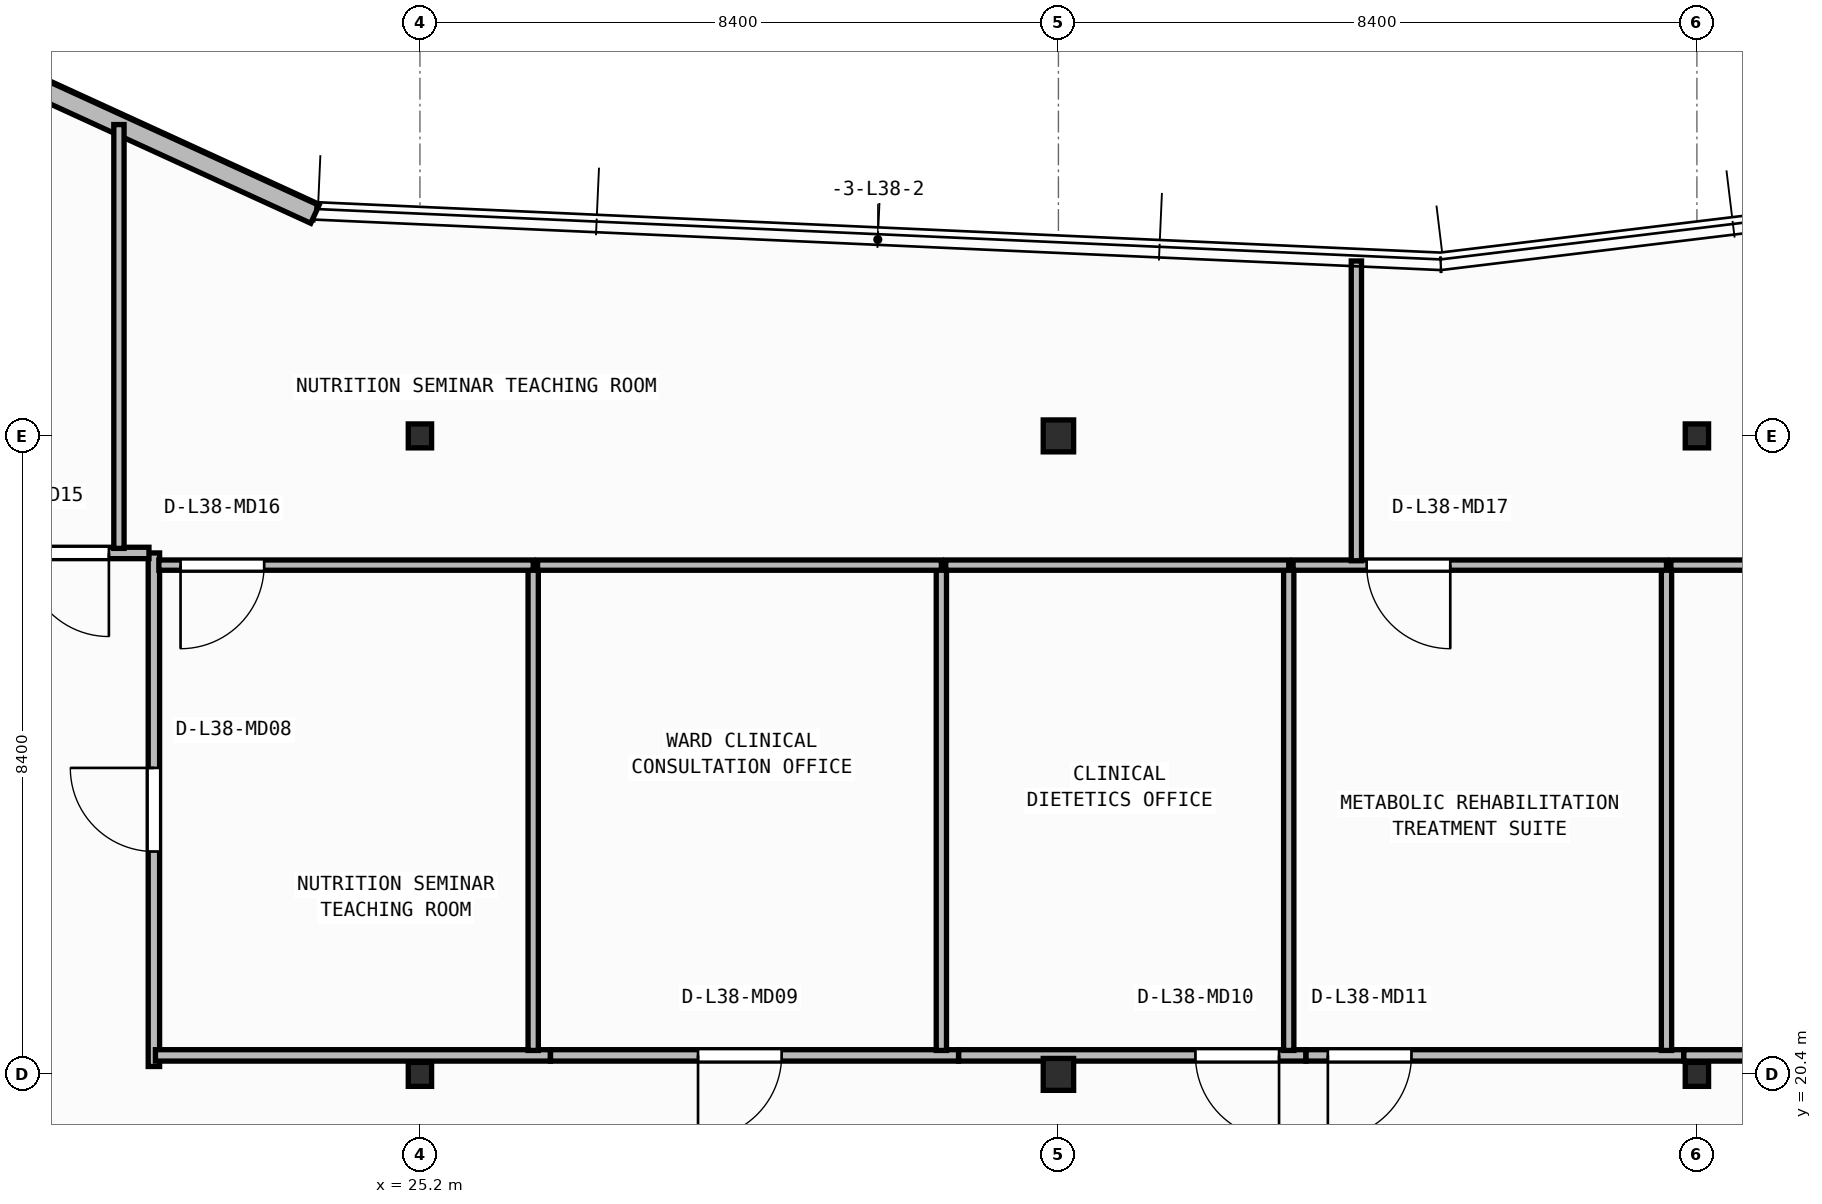
"""IFC4 building model, lengths in metres.
Left out: names, types, materials, properties, quantities, classifications, styles, units other than length and angle.
Written with IfcOpenShell. Run it as: python <this file> out.ifc"""

import sys

from ifc_helpers import new_model, si_unit, direction, frame, frame_2d, origin, origin_2d, place, context, subcontext, project, spatial, rectangle, i_section, extrude, element, fill, save


model = new_model("IFC4")
c1 = context("Model", 3, precision=1e-05, world=origin(), true_north=direction((0.0, 1.0)))
c2 = subcontext(c1, "Body", "Model", "MODEL_VIEW")
j1 = project(units=[si_unit("LENGTHUNIT", "METRE"), si_unit("PLANEANGLEUNIT", "RADIAN")], contexts=[c1])
p1 = place(None, origin())
s1 = spatial("IfcSite", under=j1, at=p1, CompositionType="ELEMENT")
p2 = place(p1, origin())
s2 = spatial("IfcBuilding", under=s1, at=p2, CompositionType="ELEMENT")
p3 = place(p2, frame((0.0, 0.0, 154.7)))
s3 = spatial("IfcBuildingStorey", under=s2, at=p3, CompositionType="ELEMENT", Elevation=154.7)
p4 = place(p3, frame((25.2, 20.4, 0.0), z_axis=(0.0, 0.0, 1.0), x_axis=(1.0, 0.0, 0.0)))
e1 = element("IfcColumn", 1, at=p4, inside=s3, PredefinedType="COLUMN", context=c2, shape_type="SweptSolid", body=[
    extrude(i_section(OverallWidth=0.307, OverallDepth=0.315, WebThickness=0.012, FlangeThickness=0.019, FilletRadius=0.017, at=origin_2d()), origin(), (0.0, 0.0, 1.0), 3.95),
])
p5 = place(p3, frame((33.6, 20.4, 0.0), z_axis=(0.0, 0.0, 1.0), x_axis=(1.0, 0.0, 0.0)))
e2 = element("IfcColumn", 2, at=p5, inside=s3, PredefinedType="COLUMN", context=c2, shape_type="SweptSolid", body=[
    extrude(i_section(OverallWidth=0.4, OverallDepth=0.42, WebThickness=0.025, FlangeThickness=0.04, at=origin_2d()), origin(), (0.0, 0.0, 1.0), 3.95),
])
for number, where, z_axis, x_axis in (
    (3, (42.0, 20.4, 0.0), (0.0, 0.0, 1.0), (1.0, 0.0, 0.0)),
    (4, (25.2, 28.8, 0.0), (0.0, 0.0, 1.0), (1.0, 0.0, 0.0)),
):
    element("IfcColumn", number, at=place(p3, frame(where, z_axis=z_axis, x_axis=x_axis)), inside=s3, PredefinedType="COLUMN", context=c2, shape_type="SweptSolid", body=[
        extrude(i_section(OverallWidth=0.307, OverallDepth=0.315, WebThickness=0.012, FlangeThickness=0.019, FilletRadius=0.017, at=origin_2d()), origin(), (0.0, 0.0, 1.0), 3.95),
    ])
p6 = place(p3, frame((33.6, 28.8, 0.0), z_axis=(0.0, 0.0, 1.0), x_axis=(1.0, 0.0, 0.0)))
e5 = element("IfcColumn", 5, at=p6, inside=s3, PredefinedType="COLUMN", context=c2, shape_type="SweptSolid", body=[
    extrude(i_section(OverallWidth=0.4, OverallDepth=0.42, WebThickness=0.025, FlangeThickness=0.04, at=origin_2d()), origin(), (0.0, 0.0, 1.0), 3.95),
])
p7 = place(p3, frame((42.0, 28.8, 0.0), z_axis=(0.0, 0.0, 1.0), x_axis=(1.0, 0.0, 0.0)))
e6 = element("IfcColumn", 6, at=p7, inside=s3, PredefinedType="COLUMN", context=c2, shape_type="SweptSolid", body=[
    extrude(i_section(OverallWidth=0.307, OverallDepth=0.315, WebThickness=0.012, FlangeThickness=0.019, FilletRadius=0.017, at=origin_2d()), origin(), (0.0, 0.0, 1.0), 3.95),
])
p8 = place(p3, frame((23.818, 31.716, 0.0), z_axis=(0.0, 0.0, 1.0), x_axis=(-0.909209527513, 0.416338846471, 0.0)))
e7 = element("IfcWall", 7, at=p8, inside=s3, PredefinedType="STANDARD", context=c2, shape_type="SweptSolid", body=[
    extrude(rectangle(XDim=13.787, YDim=0.26, at=frame_2d((6.894, 0.0))), origin(), (0.0, 0.0, 1.0), 3.71),
])
p9 = place(p8, frame((5.694, 0.0, 0.9)))
e8 = element("IfcOpeningElement", 8, at=p9, cuts=e7, PredefinedType="OPENING", context=c2, shape_type="SweptSolid", body=[
    extrude(rectangle(XDim=2.4, YDim=1.65, at=frame_2d((1.2, 0.825))), frame((0.0, 0.14, 0.0), z_axis=(0.0, -1.0, 0.0), x_axis=(1.0, 0.0, 0.0)), (0.0, 0.0, 1.0), 0.28),
])
p10 = place(p3, frame((21.7, 20.504, 0.0), z_axis=(0.0, 0.0, 1.0), x_axis=(0.0, 1.0, 0.0)))
e9 = element("IfcWall", 9, at=p10, inside=s3, PredefinedType="PARTITIONING", context=c2, shape_type="SweptSolid", body=[
    extrude(rectangle(XDim=6.756, YDim=0.15, at=frame_2d((3.378, 0.0))), origin(), (0.0, 0.0, 1.0), 3.71),
])
p11 = place(p10, frame((2.828, 0.0, 0.0)))
e10 = element("IfcOpeningElement", 10, at=p11, cuts=e9, PredefinedType="OPENING", context=c2, shape_type="SweptSolid", body=[
    extrude(rectangle(XDim=1.1, YDim=2.1, at=frame_2d((0.55, 1.05))), frame((0.0, 0.085, 0.0), z_axis=(0.0, -1.0, 0.0), x_axis=(1.0, 0.0, 0.0)), (0.0, 0.0, 1.0), 0.17),
])
p12 = place(p3, frame((21.635, 27.26, 0.0), z_axis=(0.0, 0.0, 1.0), x_axis=(-1.0, 0.0, 0.0)))
e11 = element("IfcWall", 11, at=p12, inside=s3, PredefinedType="PARTITIONING", context=c2, shape_type="SweptSolid", body=[
    extrude(rectangle(XDim=2.435, YDim=0.15, at=frame_2d((1.218, 0.0))), origin(), (0.0, 0.0, 1.0), 3.71),
])
p13 = place(p12, frame((0.527, 0.0, 0.0)))
e12 = element("IfcOpeningElement", 12, at=p13, cuts=e11, PredefinedType="OPENING", context=c2, shape_type="SweptSolid", body=[
    extrude(rectangle(XDim=1.1, YDim=2.1, at=frame_2d((0.55, 1.05))), frame((0.0, 0.085, 0.0), z_axis=(0.0, -1.0, 0.0), x_axis=(1.0, 0.0, 0.0)), (0.0, 0.0, 1.0), 0.17),
])
p14 = place(p3, frame((26.916, 20.65, 0.0), z_axis=(0.0, 0.0, 1.0), x_axis=(-1.0, 0.0, 0.0)))
e13 = element("IfcWall", 13, at=p14, inside=s3, PredefinedType="PARTITIONING", context=c2, shape_type="SweptSolid", body=[
    extrude(rectangle(XDim=5.196, YDim=0.15, at=frame_2d((2.598, 0.0))), origin(), (0.0, 0.0, 1.0), 3.083),
])
p15 = place(p3, frame((32.286, 20.65, 0.0), z_axis=(0.0, 0.0, 1.0), x_axis=(-1.0, 0.0, 0.0)))
e14 = element("IfcWall", 14, at=p15, inside=s3, PredefinedType="PARTITIONING", context=c2, shape_type="SweptSolid", body=[
    extrude(rectangle(XDim=5.368, YDim=0.15, at=frame_2d((2.684, 0.0))), origin(), (0.0, 0.0, 1.0), 3.083),
])
p16 = place(p15, frame((2.327, 0.0, 0.0)))
e15 = element("IfcOpeningElement", 15, at=p16, cuts=e14, PredefinedType="OPENING", context=c2, shape_type="SweptSolid", body=[
    extrude(rectangle(XDim=1.1, YDim=2.1, at=frame_2d((0.55, 1.05))), frame((0.0, 0.085, 0.0), z_axis=(0.0, -1.0, 0.0), x_axis=(1.0, 0.0, 0.0)), (0.0, 0.0, 1.0), 0.17),
])
p17 = place(p3, frame((36.856, 20.65, 0.0), z_axis=(0.0, 0.0, 1.0), x_axis=(-1.0, 0.0, 0.0)))
e16 = element("IfcWall", 16, at=p17, inside=s3, PredefinedType="PARTITIONING", context=c2, shape_type="SweptSolid", body=[
    extrude(rectangle(XDim=4.568, YDim=0.15, at=frame_2d((2.284, 0.0))), origin(), (0.0, 0.0, 1.0), 3.083),
])
p18 = place(p17, frame((0.354, 0.0, 0.0)))
e17 = element("IfcOpeningElement", 17, at=p18, cuts=e16, PredefinedType="OPENING", context=c2, shape_type="SweptSolid", body=[
    extrude(rectangle(XDim=1.1, YDim=2.1, at=frame_2d((0.55, 1.05))), frame((0.0, 0.085, 0.0), z_axis=(0.0, -1.0, 0.0), x_axis=(1.0, 0.0, 0.0)), (0.0, 0.0, 1.0), 0.17),
])
p19 = place(p3, frame((41.826, 20.65, 0.0), z_axis=(0.0, 0.0, 1.0), x_axis=(-1.0, 0.0, 0.0)))
e18 = element("IfcWall", 18, at=p19, inside=s3, PredefinedType="PARTITIONING", context=c2, shape_type="SweptSolid", body=[
    extrude(rectangle(XDim=4.968, YDim=0.15, at=frame_2d((2.484, 0.0))), origin(), (0.0, 0.0, 1.0), 3.083),
])
p20 = place(p19, frame((3.581, 0.0, 0.0)))
e19 = element("IfcOpeningElement", 19, at=p20, cuts=e18, PredefinedType="OPENING", context=c2, shape_type="SweptSolid", body=[
    extrude(rectangle(XDim=1.1, YDim=2.1, at=frame_2d((0.55, 1.05))), frame((0.0, 0.085, 0.0), z_axis=(0.0, -1.0, 0.0), x_axis=(1.0, 0.0, 0.0)), (0.0, 0.0, 1.0), 0.17),
])
p21 = place(p3, frame((47.196, 20.65, 0.0), z_axis=(0.0, 0.0, 1.0), x_axis=(-1.0, 0.0, 0.0)))
e20 = element("IfcWall", 20, at=p21, inside=s3, PredefinedType="PARTITIONING", context=c2, shape_type="SweptSolid", body=[
    extrude(rectangle(XDim=5.368, YDim=0.15, at=frame_2d((2.684, 0.0))), origin(), (0.0, 0.0, 1.0), 3.083),
])
p22 = place(p21, frame((0.393, 0.0, 0.0)))
e21 = element("IfcOpeningElement", 21, at=p22, cuts=e20, PredefinedType="OPENING", context=c2, shape_type="SweptSolid", body=[
    extrude(rectangle(XDim=1.1, YDim=2.1, at=frame_2d((0.55, 1.05))), frame((0.0, 0.085, 0.0), z_axis=(0.0, -1.0, 0.0), x_axis=(1.0, 0.0, 0.0)), (0.0, 0.0, 1.0), 0.17),
])
p23 = place(p3, frame((26.69, 20.715, 0.0), z_axis=(0.0, 0.0, 1.0), x_axis=(0.0, 1.0, 0.0)))
e22 = element("IfcWall", 22, at=p23, inside=s3, PredefinedType="PARTITIONING", context=c2, shape_type="SweptSolid", body=[
    extrude(rectangle(XDim=6.385, YDim=0.135, at=frame_2d((3.192, 0.0))), origin(), (0.0, 0.0, 1.0), 3.71),
])
p24 = place(p3, frame((26.69, 27.1, 0.0), z_axis=(0.0, 0.0, 1.0), x_axis=(-1.0, 0.0, 0.0)))
e23 = element("IfcWall", 23, at=p24, inside=s3, PredefinedType="PARTITIONING", context=c2, shape_type="SweptSolid", body=[
    extrude(rectangle(XDim=4.925, YDim=0.135, at=frame_2d((2.462, 0.0))), origin(), (0.0, 0.0, 1.0), 3.71),
])
p25 = place(p24, frame((3.539, 0.0, 0.0)))
e24 = element("IfcOpeningElement", 24, at=p25, cuts=e23, PredefinedType="OPENING", context=c2, shape_type="SweptSolid", body=[
    extrude(rectangle(XDim=1.1, YDim=2.1, at=frame_2d((0.55, 1.05))), frame((0.0, 0.077, 0.0), z_axis=(0.0, -1.0, 0.0), x_axis=(1.0, 0.0, 0.0)), (0.0, 0.0, 1.0), 0.155),
])
p26 = place(p3, frame((32.06, 20.715, 0.0), z_axis=(0.0, 0.0, 1.0), x_axis=(0.0, 1.0, 0.0)))
e25 = element("IfcWall", 25, at=p26, inside=s3, PredefinedType="PARTITIONING", context=c2, shape_type="SweptSolid", body=[
    extrude(rectangle(XDim=6.385, YDim=0.135, at=frame_2d((3.192, 0.0))), origin(), (0.0, 0.0, 1.0), 3.71),
])
p27 = place(p3, frame((32.06, 27.1, 0.0), z_axis=(0.0, 0.0, 1.0), x_axis=(-1.0, 0.0, 0.0)))
e26 = element("IfcWall", 26, at=p27, inside=s3, PredefinedType="PARTITIONING", context=c2, shape_type="SweptSolid", body=[
    extrude(rectangle(XDim=5.312, YDim=0.135, at=frame_2d((2.656, 0.0))), origin(), (0.0, 0.0, 1.0), 3.71),
])
p28 = place(p3, frame((36.63, 20.715, 0.0), z_axis=(0.0, 0.0, 1.0), x_axis=(0.0, 1.0, 0.0)))
e27 = element("IfcWall", 27, at=p28, inside=s3, PredefinedType="PARTITIONING", context=c2, shape_type="SweptSolid", body=[
    extrude(rectangle(XDim=6.385, YDim=0.135, at=frame_2d((3.192, 0.0))), origin(), (0.0, 0.0, 1.0), 3.71),
])
p29 = place(p3, frame((36.63, 27.1, 0.0), z_axis=(0.0, 0.0, 1.0), x_axis=(-1.0, 0.0, 0.0)))
e28 = element("IfcWall", 28, at=p29, inside=s3, PredefinedType="PARTITIONING", context=c2, shape_type="SweptSolid", body=[
    extrude(rectangle(XDim=4.512, YDim=0.135, at=frame_2d((2.256, 0.0))), origin(), (0.0, 0.0, 1.0), 3.71),
])
p30 = place(p3, frame((41.6, 20.715, 0.0), z_axis=(0.0, 0.0, 1.0), x_axis=(0.0, 1.0, 0.0)))
e29 = element("IfcWall", 29, at=p30, inside=s3, PredefinedType="PARTITIONING", context=c2, shape_type="SweptSolid", body=[
    extrude(rectangle(XDim=6.385, YDim=0.135, at=frame_2d((3.192, 0.0))), origin(), (0.0, 0.0, 1.0), 3.152),
])
p31 = place(p3, frame((41.6, 27.1, 0.0), z_axis=(0.0, 0.0, 1.0), x_axis=(-1.0, 0.0, 0.0)))
e30 = element("IfcWall", 30, at=p31, inside=s3, PredefinedType="PARTITIONING", context=c2, shape_type="SweptSolid", body=[
    extrude(rectangle(XDim=4.913, YDim=0.135, at=frame_2d((2.456, 0.0))), origin(), (0.0, 0.0, 1.0), 3.71),
])
p32 = place(p31, frame((2.845, 0.0, 0.0)))
e31 = element("IfcOpeningElement", 31, at=p32, cuts=e30, PredefinedType="OPENING", context=c2, shape_type="SweptSolid", body=[
    extrude(rectangle(XDim=1.1, YDim=2.1, at=frame_2d((0.55, 1.05))), frame((0.0, 0.077, 0.0), z_axis=(0.0, -1.0, 0.0), x_axis=(1.0, 0.0, 0.0)), (0.0, 0.0, 1.0), 0.155),
])
p33 = place(p3, frame((46.97, 27.1, 0.0), z_axis=(0.0, 0.0, 1.0), x_axis=(-1.0, 0.0, 0.0)))
e32 = element("IfcWall", 32, at=p33, inside=s3, PredefinedType="PARTITIONING", context=c2, shape_type="SweptSolid", body=[
    extrude(rectangle(XDim=5.312, YDim=0.135, at=frame_2d((2.656, 0.0))), origin(), (0.0, 0.0, 1.0), 3.71),
])
p34 = place(p3, frame((21.24, 27.32, 0.0), z_axis=(0.0, 0.0, 1.0), x_axis=(0.0, 1.0, 0.0)))
e33 = element("IfcWall", 33, at=p34, inside=s3, PredefinedType="PARTITIONING", context=c2, shape_type="SweptSolid", body=[
    extrude(rectangle(XDim=5.576, YDim=0.135, at=frame_2d((2.788, 0.0))), origin(), (0.0, 0.0, 1.0), 3.71),
])
p35 = place(p3, frame((37.52, 27.157, 0.0), z_axis=(0.0, 0.0, 1.0), x_axis=(0.0, 1.0, 0.0)))
e34 = element("IfcWall", 34, at=p35, inside=s3, PredefinedType="PARTITIONING", context=c2, shape_type="SweptSolid", body=[
    extrude(rectangle(XDim=3.944, YDim=0.135, at=frame_2d((1.972, 0.0))), origin(), (0.0, 0.0, 1.0), 3.71),
])
p36 = place(p11, origin())
e35 = element("IfcDoor", 35, at=p36, inside=s3, OperationType="SINGLE_SWING_RIGHT", PredefinedType="DOOR", context=c2, shape_type="SweptSolid", body=[
    extrude(rectangle(XDim=1.1, YDim=2.1, at=frame_2d((0.55, 1.05))), frame((0.0, 0.025, 0.0), z_axis=(0.0, -1.0, 0.0), x_axis=(1.0, 0.0, 0.0)), (0.0, 0.0, 1.0), 0.05),
])
fill(e10, e35)
p37 = place(p13, origin())
e36 = element("IfcDoor", 36, at=p37, inside=s3, OperationType="SINGLE_SWING_LEFT", PredefinedType="DOOR", context=c2, shape_type="SweptSolid", body=[
    extrude(rectangle(XDim=1.1, YDim=2.1, at=frame_2d((0.55, 1.05))), frame((0.0, 0.025, 0.0), z_axis=(0.0, -1.0, 0.0), x_axis=(1.0, 0.0, 0.0)), (0.0, 0.0, 1.0), 0.05),
])
fill(e12, e36)
p38 = place(p16, origin())
e37 = element("IfcDoor", 37, at=p38, inside=s3, OperationType="SINGLE_SWING_RIGHT", PredefinedType="DOOR", context=c2, shape_type="SweptSolid", body=[
    extrude(rectangle(XDim=1.1, YDim=2.1, at=frame_2d((0.55, 1.05))), frame((0.0, 0.025, 0.0), z_axis=(0.0, -1.0, 0.0), x_axis=(1.0, 0.0, 0.0)), (0.0, 0.0, 1.0), 0.05),
])
fill(e15, e37)
p39 = place(p18, origin())
e38 = element("IfcDoor", 38, at=p39, inside=s3, OperationType="SINGLE_SWING_LEFT", PredefinedType="DOOR", context=c2, shape_type="SweptSolid", body=[
    extrude(rectangle(XDim=1.1, YDim=2.1, at=frame_2d((0.55, 1.05))), frame((0.0, 0.025, 0.0), z_axis=(0.0, -1.0, 0.0), x_axis=(1.0, 0.0, 0.0)), (0.0, 0.0, 1.0), 0.05),
])
fill(e17, e38)
p40 = place(p20, origin())
e39 = element("IfcDoor", 39, at=p40, inside=s3, OperationType="SINGLE_SWING_RIGHT", PredefinedType="DOOR", context=c2, shape_type="SweptSolid", body=[
    extrude(rectangle(XDim=1.1, YDim=2.1, at=frame_2d((0.55, 1.05))), frame((0.0, 0.025, 0.0), z_axis=(0.0, -1.0, 0.0), x_axis=(1.0, 0.0, 0.0)), (0.0, 0.0, 1.0), 0.05),
])
fill(e19, e39)
p41 = place(p25, origin())
e40 = element("IfcDoor", 40, at=p41, inside=s3, OperationType="SINGLE_SWING_RIGHT", PredefinedType="DOOR", context=c2, shape_type="SweptSolid", body=[
    extrude(rectangle(XDim=1.1, YDim=2.1, at=frame_2d((0.55, 1.05))), frame((0.0, 0.025, 0.0), z_axis=(0.0, -1.0, 0.0), x_axis=(1.0, 0.0, 0.0)), (0.0, 0.0, 1.0), 0.05),
])
fill(e24, e40)
p42 = place(p32, origin())
e41 = element("IfcDoor", 41, at=p42, inside=s3, OperationType="SINGLE_SWING_LEFT", PredefinedType="DOOR", context=c2, shape_type="SweptSolid", body=[
    extrude(rectangle(XDim=1.1, YDim=2.1, at=frame_2d((0.55, 1.05))), frame((0.0, 0.025, 0.0), z_axis=(0.0, -1.0, 0.0), x_axis=(1.0, 0.0, 0.0)), (0.0, 0.0, 1.0), 0.05),
])
fill(e31, e41)
save(model, sys.argv[1])
